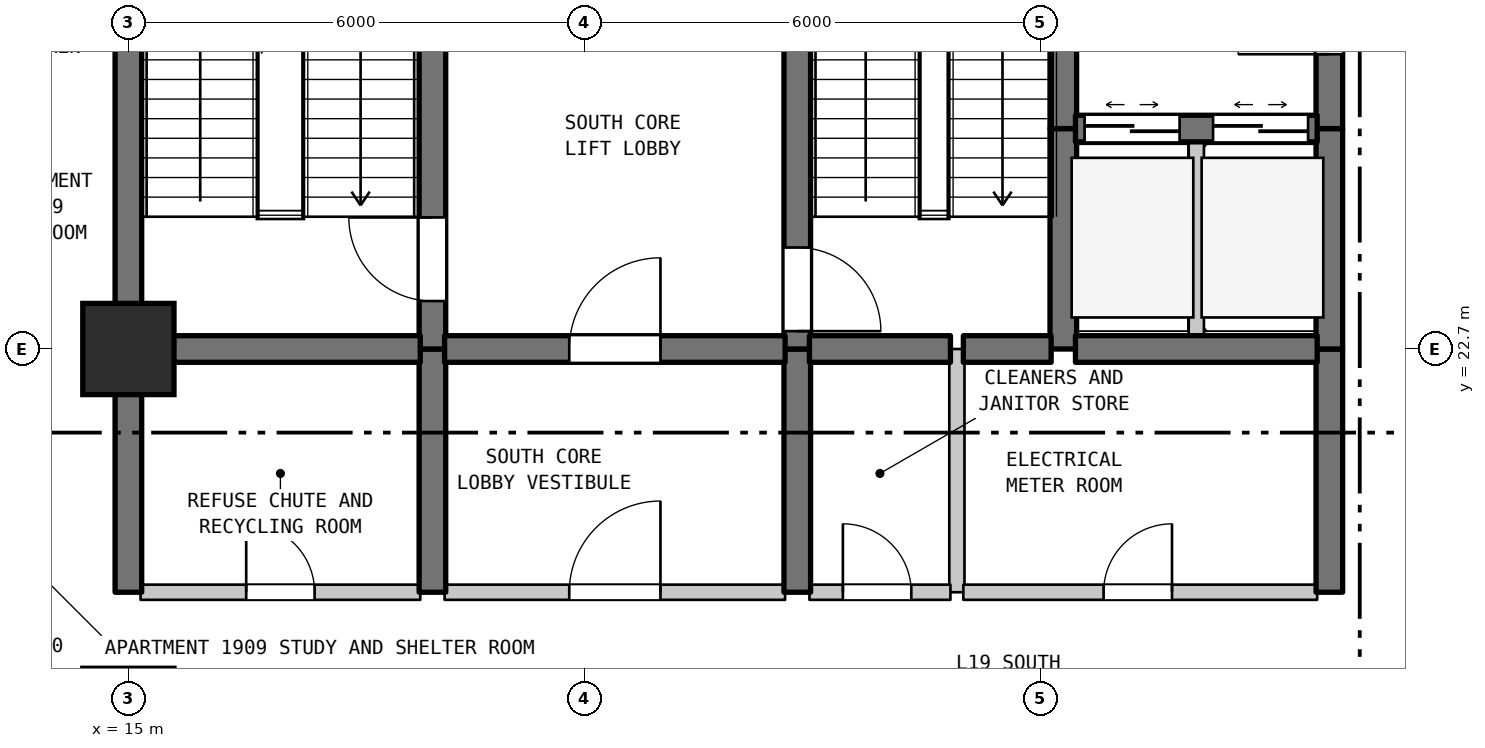
"""IFC4 building model, lengths in metres.
Left out: names, types, materials, properties, quantities, classifications, styles, units other than length and angle.
Written with IfcOpenShell. Run it as: python <this file> out.ifc"""

import sys

from ifc_helpers import new_model, si_unit, direction, frame, frame_2d, origin, origin_2d, place, context, subcontext, project, spatial, rectangle, extrude, element, fill, save


model = new_model("IFC4")
c1 = context("Model", 3, precision=1e-05, world=origin(), true_north=direction((0.0, 1.0)))
c2 = subcontext(c1, "Body", "Model", "MODEL_VIEW")
j1 = project(units=[si_unit("LENGTHUNIT", "METRE"), si_unit("PLANEANGLEUNIT", "RADIAN")], contexts=[c1])
p1 = place(None, origin())
s1 = spatial("IfcSite", under=j1, at=p1, CompositionType="ELEMENT")
p2 = place(p1, origin())
s2 = spatial("IfcBuilding", under=s1, at=p2, CompositionType="ELEMENT")
p3 = place(p2, frame((0.0, 0.0, 81.2)))
s3 = spatial("IfcBuildingStorey", under=s2, at=p3, CompositionType="ELEMENT", Elevation=81.2)
p4 = place(p3, frame((15.0, 22.7, 0.0), z_axis=(0.0, 0.0, 1.0), x_axis=(1.0, 0.0, 0.0)))
e1 = element("IfcColumn", 1, at=p4, inside=s3, PredefinedType="COLUMN", context=c2, shape_type="SweptSolid", body=[
    extrude(rectangle(XDim=1.2, YDim=1.2, at=origin_2d()), origin(), (0.0, 0.0, 1.0), 5.2),
])
p5 = place(p3, frame((15.0, 19.5, 0.0), z_axis=(0.0, 0.0, 1.0), x_axis=(0.0, 1.0, 0.0)))
e2 = element("IfcWall", 2, at=p5, inside=s3, PredefinedType="SHEAR", context=c2, shape_type="SweptSolid", body=[
    extrude(rectangle(XDim=3.2, YDim=0.35, at=frame_2d((1.6, 0.0))), origin(), (0.0, 0.0, 1.0), 4.885),
])
p6 = place(p3, frame((15.0, 22.7, 0.0), z_axis=(0.0, 0.0, 1.0), x_axis=(0.0, 1.0, 0.0)))
e3 = element("IfcWall", 3, at=p6, inside=s3, PredefinedType="SHEAR", context=c2, shape_type="SweptSolid", body=[
    extrude(rectangle(XDim=6.8, YDim=0.35, at=frame_2d((3.4, 0.0))), origin(), (0.0, 0.0, 1.0), 4.885),
])
p7 = place(p3, frame((19.0, 19.5, 0.0), z_axis=(0.0, 0.0, 1.0), x_axis=(0.0, 1.0, 0.0)))
e4 = element("IfcWall", 4, at=p7, inside=s3, PredefinedType="SHEAR", context=c2, shape_type="SweptSolid", body=[
    extrude(rectangle(XDim=3.2, YDim=0.35, at=frame_2d((1.6, 0.0))), origin(), (0.0, 0.0, 1.0), 4.885),
])
p8 = place(p3, frame((19.0, 22.7, 0.0), z_axis=(0.0, 0.0, 1.0), x_axis=(0.0, 1.0, 0.0)))
e5 = element("IfcWall", 5, at=p8, inside=s3, PredefinedType="SHEAR", context=c2, shape_type="SweptSolid", body=[
    extrude(rectangle(XDim=5.5, YDim=0.35, at=frame_2d((2.75, 0.0))), origin(), (0.0, 0.0, 1.0), 4.885),
])
p9 = place(p8, frame((0.631, 0.0, 0.0)))
e6 = element("IfcOpeningElement", 6, at=p9, cuts=e5, PredefinedType="OPENING", context=c2, shape_type="SweptSolid", body=[
    extrude(rectangle(XDim=1.1, YDim=2.15, at=frame_2d((0.55, 1.075))), frame((0.0, 0.185, 0.0), z_axis=(0.0, -1.0, 0.0), x_axis=(1.0, 0.0, 0.0)), (0.0, 0.0, 1.0), 0.37),
])
p10 = place(p3, frame((23.8, 19.5, 0.0), z_axis=(0.0, 0.0, 1.0), x_axis=(0.0, 1.0, 0.0)))
e7 = element("IfcWall", 7, at=p10, inside=s3, PredefinedType="SHEAR", context=c2, shape_type="SweptSolid", body=[
    extrude(rectangle(XDim=3.2, YDim=0.35, at=frame_2d((1.6, 0.0))), origin(), (0.0, 0.0, 1.0), 4.885),
])
p11 = place(p3, frame((23.8, 22.7, 0.0), z_axis=(0.0, 0.0, 1.0), x_axis=(0.0, 1.0, 0.0)))
e8 = element("IfcWall", 8, at=p11, inside=s3, PredefinedType="SHEAR", context=c2, shape_type="SweptSolid", body=[
    extrude(rectangle(XDim=5.5, YDim=0.35, at=frame_2d((2.75, 0.0))), origin(), (0.0, 0.0, 1.0), 4.885),
])
p12 = place(p11, frame((0.235, 0.0, 0.0)))
e9 = element("IfcOpeningElement", 9, at=p12, cuts=e8, PredefinedType="OPENING", context=c2, shape_type="SweptSolid", body=[
    extrude(rectangle(XDim=1.1, YDim=2.15, at=frame_2d((0.55, 1.075))), frame((0.0, 0.185, 0.0), z_axis=(0.0, -1.0, 0.0), x_axis=(1.0, 0.0, 0.0)), (0.0, 0.0, 1.0), 0.37),
])
p13 = place(p3, frame((25.9, 19.5, 0.0), z_axis=(0.0, 0.0, 1.0), x_axis=(0.0, 1.0, 0.0)))
e10 = element("IfcWall", 10, at=p13, inside=s3, PredefinedType="STANDARD", context=c2, shape_type="SweptSolid", body=[
    extrude(rectangle(XDim=3.2, YDim=0.2, at=frame_2d((1.6, 0.0))), origin(), (0.0, 0.0, 1.0), 4.885),
])
p14 = place(p3, frame((27.3, 22.7, 0.0), z_axis=(0.0, 0.0, 1.0), x_axis=(0.0, 1.0, 0.0)))
e11 = element("IfcWall", 11, at=p14, inside=s3, PredefinedType="SHEAR", context=c2, shape_type="SweptSolid", body=[
    extrude(rectangle(XDim=2.9, YDim=0.35, at=frame_2d((1.45, 0.0))), origin(), (0.0, 0.0, 1.0), 4.885),
])
p15 = place(p3, frame((27.3, 25.6, 0.0), z_axis=(0.0, 0.0, 1.0), x_axis=(0.0, 1.0, 0.0)))
e12 = element("IfcWall", 12, at=p15, inside=s3, PredefinedType="SHEAR", context=c2, shape_type="SweptSolid", body=[
    extrude(rectangle(XDim=3.3, YDim=0.35, at=frame_2d((1.65, 0.0))), origin(), (0.0, 0.0, 1.0), 4.885),
])
p16 = place(p3, frame((29.05, 22.7, 0.0), z_axis=(0.0, 0.0, 1.0), x_axis=(0.0, 1.0, 0.0)))
e13 = element("IfcWall", 13, at=p16, inside=s3, PredefinedType="STANDARD", context=c2, shape_type="SweptSolid", body=[
    extrude(rectangle(XDim=2.9, YDim=0.2, at=frame_2d((1.45, 0.0))), origin(), (0.0, 0.0, 1.0), 4.885),
])
p17 = place(p3, frame((30.8, 19.5, 0.0), z_axis=(0.0, 0.0, 1.0), x_axis=(0.0, 1.0, 0.0)))
e14 = element("IfcWall", 14, at=p17, inside=s3, PredefinedType="SHEAR", context=c2, shape_type="SweptSolid", body=[
    extrude(rectangle(XDim=3.2, YDim=0.35, at=frame_2d((1.6, 0.0))), origin(), (0.0, 0.0, 1.0), 4.885),
])
p18 = place(p3, frame((30.8, 22.7, 0.0), z_axis=(0.0, 0.0, 1.0), x_axis=(0.0, 1.0, 0.0)))
e15 = element("IfcWall", 15, at=p18, inside=s3, PredefinedType="SHEAR", context=c2, shape_type="SweptSolid", body=[
    extrude(rectangle(XDim=2.9, YDim=0.35, at=frame_2d((1.45, 0.0))), origin(), (0.0, 0.0, 1.0), 4.885),
])
p19 = place(p3, frame((30.8, 25.6, 0.0), z_axis=(0.0, 0.0, 1.0), x_axis=(0.0, 1.0, 0.0)))
e16 = element("IfcWall", 16, at=p19, inside=s3, PredefinedType="SHEAR", context=c2, shape_type="SweptSolid", body=[
    extrude(rectangle(XDim=3.3, YDim=0.35, at=frame_2d((1.65, 0.0))), origin(), (0.0, 0.0, 1.0), 4.885),
])
p20 = place(p19, frame((0.978, 0.0, 0.0)))
e17 = element("IfcOpeningElement", 17, at=p20, cuts=e16, PredefinedType="OPENING", context=c2, shape_type="SweptSolid", body=[
    extrude(rectangle(XDim=1.2, YDim=2.2, at=frame_2d((0.6, 1.1))), frame((0.0, 0.185, 0.0), z_axis=(0.0, -1.0, 0.0), x_axis=(1.0, 0.0, 0.0)), (0.0, 0.0, 1.0), 0.37),
])
p21 = place(p3, frame((15.16, 19.5, 0.0), z_axis=(0.0, 0.0, 1.0), x_axis=(1.0, 0.0, 0.0)))
e18 = element("IfcWall", 18, at=p21, inside=s3, PredefinedType="STANDARD", context=c2, shape_type="SweptSolid", body=[
    extrude(rectangle(XDim=3.68, YDim=0.2, at=frame_2d((1.84, 0.0))), origin(), (0.0, 0.0, 1.0), 4.885),
])
p22 = place(p21, frame((1.39, 0.0, 0.0)))
e19 = element("IfcOpeningElement", 19, at=p22, cuts=e18, PredefinedType="OPENING", context=c2, shape_type="SweptSolid", body=[
    extrude(rectangle(XDim=0.9, YDim=2.15, at=frame_2d((0.45, 1.075))), frame((0.0, 0.11, 0.0), z_axis=(0.0, -1.0, 0.0), x_axis=(1.0, 0.0, 0.0)), (0.0, 0.0, 1.0), 0.22),
])
p23 = place(p3, frame((19.16, 19.5, 0.0), z_axis=(0.0, 0.0, 1.0), x_axis=(1.0, 0.0, 0.0)))
e20 = element("IfcWall", 20, at=p23, inside=s3, PredefinedType="STANDARD", context=c2, shape_type="SweptSolid", body=[
    extrude(rectangle(XDim=4.48, YDim=0.2, at=frame_2d((2.24, 0.0))), origin(), (0.0, 0.0, 1.0), 4.885),
])
p24 = place(p23, frame((1.64, 0.0, 0.0)))
e21 = element("IfcOpeningElement", 21, at=p24, cuts=e20, PredefinedType="OPENING", context=c2, shape_type="SweptSolid", body=[
    extrude(rectangle(XDim=1.2, YDim=2.2, at=frame_2d((0.6, 1.1))), frame((0.0, 0.11, 0.0), z_axis=(0.0, -1.0, 0.0), x_axis=(1.0, 0.0, 0.0)), (0.0, 0.0, 1.0), 0.22),
])
p25 = place(p3, frame((23.96, 19.5, 0.0), z_axis=(0.0, 0.0, 1.0), x_axis=(1.0, 0.0, 0.0)))
e22 = element("IfcWall", 22, at=p25, inside=s3, PredefinedType="STANDARD", context=c2, shape_type="SweptSolid", body=[
    extrude(rectangle(XDim=1.855, YDim=0.2, at=frame_2d((0.927, 0.0))), origin(), (0.0, 0.0, 1.0), 4.885),
])
p26 = place(p25, frame((0.44, 0.0, 0.0)))
e23 = element("IfcOpeningElement", 23, at=p26, cuts=e22, PredefinedType="OPENING", context=c2, shape_type="SweptSolid", body=[
    extrude(rectangle(XDim=0.9, YDim=2.15, at=frame_2d((0.45, 1.075))), frame((0.0, 0.11, 0.0), z_axis=(0.0, -1.0, 0.0), x_axis=(1.0, 0.0, 0.0)), (0.0, 0.0, 1.0), 0.22),
])
p27 = place(p3, frame((25.985, 19.5, 0.0), z_axis=(0.0, 0.0, 1.0), x_axis=(1.0, 0.0, 0.0)))
e24 = element("IfcWall", 24, at=p27, inside=s3, PredefinedType="STANDARD", context=c2, shape_type="SweptSolid", body=[
    extrude(rectangle(XDim=4.655, YDim=0.2, at=frame_2d((2.327, 0.0))), origin(), (0.0, 0.0, 1.0), 4.885),
])
p28 = place(p27, frame((1.845, 0.0, 0.0)))
e25 = element("IfcOpeningElement", 25, at=p28, cuts=e24, PredefinedType="OPENING", context=c2, shape_type="SweptSolid", body=[
    extrude(rectangle(XDim=0.9, YDim=2.15, at=frame_2d((0.45, 1.075))), frame((0.0, 0.11, 0.0), z_axis=(0.0, -1.0, 0.0), x_axis=(1.0, 0.0, 0.0)), (0.0, 0.0, 1.0), 0.22),
])
p29 = place(p3, frame((15.16, 22.7, 0.0), z_axis=(0.0, 0.0, 1.0), x_axis=(1.0, 0.0, 0.0)))
e26 = element("IfcWall", 26, at=p29, inside=s3, PredefinedType="SHEAR", context=c2, shape_type="SweptSolid", body=[
    extrude(rectangle(XDim=3.68, YDim=0.35, at=frame_2d((1.84, 0.0))), origin(), (0.0, 0.0, 1.0), 4.885),
])
p30 = place(p3, frame((19.16, 22.7, 0.0), z_axis=(0.0, 0.0, 1.0), x_axis=(1.0, 0.0, 0.0)))
e27 = element("IfcWall", 27, at=p30, inside=s3, PredefinedType="SHEAR", context=c2, shape_type="SweptSolid", body=[
    extrude(rectangle(XDim=4.48, YDim=0.35, at=frame_2d((2.24, 0.0))), origin(), (0.0, 0.0, 1.0), 4.885),
])
p31 = place(p30, frame((1.64, 0.0, 0.0)))
e28 = element("IfcOpeningElement", 28, at=p31, cuts=e27, PredefinedType="OPENING", context=c2, shape_type="SweptSolid", body=[
    extrude(rectangle(XDim=1.2, YDim=2.2, at=frame_2d((0.6, 1.1))), frame((0.0, 0.185, 0.0), z_axis=(0.0, -1.0, 0.0), x_axis=(1.0, 0.0, 0.0)), (0.0, 0.0, 1.0), 0.37),
])
p32 = place(p3, frame((23.96, 22.7, 0.0), z_axis=(0.0, 0.0, 1.0), x_axis=(1.0, 0.0, 0.0)))
e29 = element("IfcWall", 29, at=p32, inside=s3, PredefinedType="SHEAR", context=c2, shape_type="SweptSolid", body=[
    extrude(rectangle(XDim=1.855, YDim=0.35, at=frame_2d((0.927, 0.0))), origin(), (0.0, 0.0, 1.0), 4.885),
])
p33 = place(p3, frame((25.985, 22.7, 0.0), z_axis=(0.0, 0.0, 1.0), x_axis=(1.0, 0.0, 0.0)))
e30 = element("IfcWall", 30, at=p33, inside=s3, PredefinedType="SHEAR", context=c2, shape_type="SweptSolid", body=[
    extrude(rectangle(XDim=1.155, YDim=0.35, at=frame_2d((0.577, 0.0))), origin(), (0.0, 0.0, 1.0), 4.885),
])
p34 = place(p3, frame((27.46, 22.7, 0.0), z_axis=(0.0, 0.0, 1.0), x_axis=(1.0, 0.0, 0.0)))
e31 = element("IfcWall", 31, at=p34, inside=s3, PredefinedType="SHEAR", context=c2, shape_type="SweptSolid", body=[
    extrude(rectangle(XDim=3.18, YDim=0.35, at=frame_2d((1.59, 0.0))), origin(), (0.0, 0.0, 1.0), 4.885),
])
p35 = place(p3, frame((27.46, 25.6, 0.0), z_axis=(0.0, 0.0, 1.0), x_axis=(1.0, 0.0, 0.0)))
e32 = element("IfcWall", 32, at=p35, inside=s3, PredefinedType="SHEAR", context=c2, shape_type="SweptSolid", body=[
    extrude(rectangle(XDim=3.18, YDim=0.35, at=frame_2d((1.59, 0.0))), origin(), (0.0, 0.0, 1.0), 4.885),
])
p36 = place(p35, frame((0.12, 0.0, 0.0)))
e33 = element("IfcOpeningElement", 33, at=p36, cuts=e32, PredefinedType="OPENING", context=c2, shape_type="SweptSolid", body=[
    extrude(rectangle(XDim=1.25, YDim=2.2, at=frame_2d((0.625, 1.1))), frame((0.0, 0.185, 0.0), z_axis=(0.0, -1.0, 0.0), x_axis=(1.0, 0.0, 0.0)), (0.0, 0.0, 1.0), 0.37),
])
p37 = place(p35, frame((1.81, 0.0, 0.0)))
e34 = element("IfcOpeningElement", 34, at=p37, cuts=e32, PredefinedType="OPENING", context=c2, shape_type="SweptSolid", body=[
    extrude(rectangle(XDim=1.25, YDim=2.2, at=frame_2d((0.625, 1.1))), frame((0.0, 0.185, 0.0), z_axis=(0.0, -1.0, 0.0), x_axis=(1.0, 0.0, 0.0)), (0.0, 0.0, 1.0), 0.37),
])
p38 = place(p9, origin())
e35 = element("IfcDoor", 35, at=p38, inside=s3, OperationType="SINGLE_SWING_RIGHT", PredefinedType="DOOR", context=c2, shape_type="SweptSolid", body=[
    extrude(rectangle(XDim=1.1, YDim=2.15, at=frame_2d((0.55, 1.075))), frame((0.0, 0.025, 0.0), z_axis=(0.0, -1.0, 0.0), x_axis=(1.0, 0.0, 0.0)), (0.0, 0.0, 1.0), 0.05),
])
fill(e6, e35)
p39 = place(p12, frame((1.1, 0.0, 0.0), z_axis=(0.0, 0.0, 1.0), x_axis=(-1.0, 0.0, 0.0)))
e36 = element("IfcDoor", 36, at=p39, inside=s3, OperationType="SINGLE_SWING_LEFT", PredefinedType="DOOR", context=c2, shape_type="SweptSolid", body=[
    extrude(rectangle(XDim=1.1, YDim=2.15, at=frame_2d((0.55, 1.075))), frame((0.0, 0.025, 0.0), z_axis=(0.0, -1.0, 0.0), x_axis=(1.0, 0.0, 0.0)), (0.0, 0.0, 1.0), 0.05),
])
fill(e9, e36)
p40 = place(p20, origin())
e37 = element("IfcDoor", 37, at=p40, inside=s3, OperationType="SINGLE_SWING_LEFT", PredefinedType="DOOR", context=c2, shape_type="SweptSolid", body=[
    extrude(rectangle(XDim=1.2, YDim=2.2, at=frame_2d((0.6, 1.1))), frame((0.0, 0.025, 0.0), z_axis=(0.0, -1.0, 0.0), x_axis=(1.0, 0.0, 0.0)), (0.0, 0.0, 1.0), 0.05),
])
fill(e17, e37)
p41 = place(p22, origin())
e38 = element("IfcDoor", 38, at=p41, inside=s3, OperationType="SINGLE_SWING_LEFT", PredefinedType="DOOR", context=c2, shape_type="SweptSolid", body=[
    extrude(rectangle(XDim=0.9, YDim=2.15, at=frame_2d((0.45, 1.075))), frame((0.0, 0.025, 0.0), z_axis=(0.0, -1.0, 0.0), x_axis=(1.0, 0.0, 0.0)), (0.0, 0.0, 1.0), 0.05),
])
fill(e19, e38)
p42 = place(p24, origin())
e39 = element("IfcDoor", 39, at=p42, inside=s3, OperationType="SINGLE_SWING_RIGHT", PredefinedType="DOOR", context=c2, shape_type="SweptSolid", body=[
    extrude(rectangle(XDim=1.2, YDim=2.2, at=frame_2d((0.6, 1.1))), frame((0.0, 0.025, 0.0), z_axis=(0.0, -1.0, 0.0), x_axis=(1.0, 0.0, 0.0)), (0.0, 0.0, 1.0), 0.05),
])
fill(e21, e39)
p43 = place(p26, origin())
e40 = element("IfcDoor", 40, at=p43, inside=s3, OperationType="SINGLE_SWING_LEFT", PredefinedType="DOOR", context=c2, shape_type="SweptSolid", body=[
    extrude(rectangle(XDim=0.9, YDim=2.15, at=frame_2d((0.45, 1.075))), frame((0.0, 0.025, 0.0), z_axis=(0.0, -1.0, 0.0), x_axis=(1.0, 0.0, 0.0)), (0.0, 0.0, 1.0), 0.05),
])
fill(e23, e40)
p44 = place(p28, origin())
e41 = element("IfcDoor", 41, at=p44, inside=s3, OperationType="SINGLE_SWING_RIGHT", PredefinedType="DOOR", context=c2, shape_type="SweptSolid", body=[
    extrude(rectangle(XDim=0.9, YDim=2.15, at=frame_2d((0.45, 1.075))), frame((0.0, 0.025, 0.0), z_axis=(0.0, -1.0, 0.0), x_axis=(1.0, 0.0, 0.0)), (0.0, 0.0, 1.0), 0.05),
])
fill(e25, e41)
p45 = place(p31, origin())
e42 = element("IfcDoor", 42, at=p45, inside=s3, OperationType="SINGLE_SWING_RIGHT", PredefinedType="DOOR", context=c2, shape_type="SweptSolid", body=[
    extrude(rectangle(XDim=1.2, YDim=2.2, at=frame_2d((0.6, 1.1))), frame((0.0, 0.025, 0.0), z_axis=(0.0, -1.0, 0.0), x_axis=(1.0, 0.0, 0.0)), (0.0, 0.0, 1.0), 0.05),
])
fill(e28, e42)
p46 = place(p36, origin())
e43 = element("IfcDoor", 43, at=p46, inside=s3, OperationType="DOUBLE_DOOR_SLIDING", PredefinedType="DOOR", context=c2, shape_type="SweptSolid", body=[
    extrude(rectangle(XDim=1.25, YDim=2.2, at=frame_2d((0.625, 1.1))), frame((0.0, 0.025, 0.0), z_axis=(0.0, -1.0, 0.0), x_axis=(1.0, 0.0, 0.0)), (0.0, 0.0, 1.0), 0.05),
])
fill(e33, e43)
p47 = place(p37, origin())
e44 = element("IfcDoor", 44, at=p47, inside=s3, OperationType="DOUBLE_DOOR_SLIDING", PredefinedType="DOOR", context=c2, shape_type="SweptSolid", body=[
    extrude(rectangle(XDim=1.25, YDim=2.2, at=frame_2d((0.625, 1.1))), frame((0.0, 0.025, 0.0), z_axis=(0.0, -1.0, 0.0), x_axis=(1.0, 0.0, 0.0)), (0.0, 0.0, 1.0), 0.05),
])
fill(e34, e44)
save(model, sys.argv[1])
